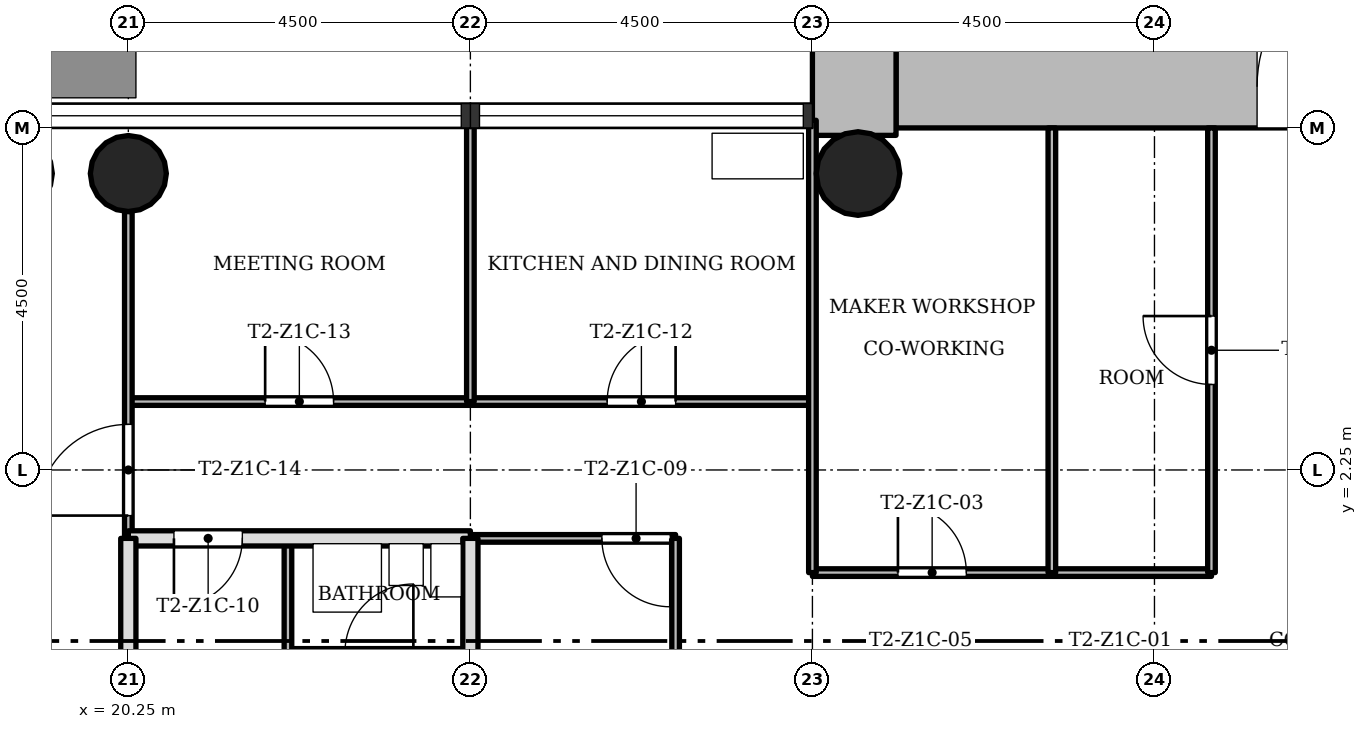
"""IFC4 building model, lengths in metres.
Left out: names, types, materials, properties, quantities, classifications, styles, units other than length and angle.
Written with IfcOpenShell. Run it as: python <this file> out.ifc"""

import sys

from ifc_helpers import new_model, si_unit, direction, frame, frame_2d, origin, origin_2d, place, context, subcontext, project, spatial, rectangle, hollow_circle, extrude, element, fill, save


model = new_model("IFC4")
c1 = context("Model", 3, precision=1e-05, world=origin(), true_north=direction((0.0, 1.0)))
c2 = subcontext(c1, "Body", "Model", "MODEL_VIEW")
j1 = project(units=[si_unit("LENGTHUNIT", "METRE"), si_unit("PLANEANGLEUNIT", "RADIAN")], contexts=[c1])
p1 = place(None, origin())
s1 = spatial("IfcSite", under=j1, at=p1, CompositionType="ELEMENT")
p2 = place(p1, origin())
s2 = spatial("IfcBuilding", under=s1, at=p2, CompositionType="ELEMENT")
p3 = place(p2, frame((0.0, 0.0, 51.7)))
s3 = spatial("IfcBuildingStorey", under=s2, at=p3, CompositionType="ELEMENT", Elevation=51.7)
p4 = place(p3, frame((30.35, 7.3, 0.0), z_axis=(0.0, 0.0, 1.0), x_axis=(1.0, 0.0, 0.0)))
e1 = element("IfcWall", 1, at=p4, inside=s3, PredefinedType="SHEAR", context=c2, shape_type="SweptSolid", body=[
    extrude(rectangle(XDim=12.4, YDim=1.1, at=frame_2d((6.2, 0.0))), origin(), (0.0, 0.0, 1.0), 3.4),
])
p5 = place(p4, frame((4.75, 0.0, 0.0)))
e2 = element("IfcOpeningElement", 2, at=p5, cuts=e1, PredefinedType="OPENING", context=c2, shape_type="SweptSolid", body=[
    extrude(rectangle(XDim=1.8, YDim=2.1, at=frame_2d((0.9, 1.05))), frame((0.0, 0.56, 0.0), z_axis=(0.0, -1.0, 0.0), x_axis=(1.0, 0.0, 0.0)), (0.0, 0.0, 1.0), 1.12),
])
p6 = place(p3, frame((29.8, 15.248, 0.0), z_axis=(0.0, 0.0, 1.0), x_axis=(0.0, -1.0, 0.0)))
e3 = element("IfcWall", 3, at=p6, inside=s3, PredefinedType="SHEAR", context=c2, shape_type="SweptSolid", body=[
    extrude(rectangle(XDim=8.596, YDim=1.1, at=frame_2d((4.298, 0.0))), origin(), (0.0, 0.0, 1.0), 3.4),
])
p7 = place(p3, frame((20.25, 6.15, 0.0), z_axis=(0.0, 0.0, 1.0), x_axis=(1.0, 0.0, 0.0)))
e4 = element("IfcColumn", 4, at=p7, inside=s3, PredefinedType="COLUMN", context=c2, shape_type="SweptSolid", body=[
    extrude(hollow_circle(Radius=0.5, WallThickness=0.036, at=origin_2d()), origin(), (0.0, 0.0, 1.0), 3.4),
])
p8 = place(p3, frame((29.85, 6.15, 0.0), z_axis=(0.0, 0.0, 1.0), x_axis=(1.0, 0.0, 0.0)))
e5 = element("IfcColumn", 5, at=p8, inside=s3, PredefinedType="COLUMN", context=c2, shape_type="SweptSolid", body=[
    extrude(hollow_circle(Radius=0.55, WallThickness=0.04, at=origin_2d()), origin(), (0.0, 0.0, 1.0), 3.4),
])
p9 = place(p3, frame((24.75, -0.15, 0.0), z_axis=(0.0, 0.0, 1.0), x_axis=(-1.0, 0.0, 0.0)))
e6 = element("IfcWall", 6, at=p9, inside=s3, PredefinedType="PARTITIONING", context=c2, shape_type="SweptSolid", body=[
    extrude(rectangle(XDim=2.4, YDim=0.1, at=frame_2d((1.2, 0.0))), origin(), (0.0, 0.0, 1.0), 3.0),
])
p10 = place(p9, frame((0.75, 0.0, 0.0)))
e7 = element("IfcOpeningElement", 7, at=p10, cuts=e6, PredefinedType="OPENING", context=c2, shape_type="SweptSolid", body=[
    extrude(rectangle(XDim=0.9, YDim=2.1, at=frame_2d((0.45, 1.05))), frame((0.0, 0.06, 0.0), z_axis=(0.0, -1.0, 0.0), x_axis=(1.0, 0.0, 0.0)), (0.0, 0.0, 1.0), 0.12),
])
p11 = place(p3, frame((34.5, 0.9, 0.0), z_axis=(0.0, 0.0, 1.0), x_axis=(-1.0, 0.0, 0.0)))
e8 = element("IfcWall", 8, at=p11, inside=s3, PredefinedType="PARTITIONING", context=c2, shape_type="SweptSolid", body=[
    extrude(rectangle(XDim=5.25, YDim=0.1, at=frame_2d((2.625, 0.0))), origin(), (0.0, 0.0, 1.0), 3.0),
])
p12 = place(p11, frame((3.225, 0.0, 0.0)))
e9 = element("IfcOpeningElement", 9, at=p12, cuts=e8, PredefinedType="OPENING", context=c2, shape_type="SweptSolid", body=[
    extrude(rectangle(XDim=0.9, YDim=2.1, at=frame_2d((0.45, 1.05))), frame((0.0, 0.06, 0.0), z_axis=(0.0, -1.0, 0.0), x_axis=(1.0, 0.0, 0.0)), (0.0, 0.0, 1.0), 0.12),
])
p13 = place(p3, frame((27.45, 1.35, 0.0), z_axis=(0.0, 0.0, 1.0), x_axis=(-1.0, 0.0, 0.0)))
e10 = element("IfcWall", 10, at=p13, inside=s3, PredefinedType="PARTITIONING", context=c2, shape_type="SweptSolid", body=[
    extrude(rectangle(XDim=2.7, YDim=0.1, at=frame_2d((1.35, 0.0))), origin(), (0.0, 0.0, 1.0), 3.0),
])
p14 = place(p13, frame((0.07, 0.0, 0.0)))
e11 = element("IfcOpeningElement", 11, at=p14, cuts=e10, PredefinedType="OPENING", context=c2, shape_type="SweptSolid", body=[
    extrude(rectangle(XDim=0.9, YDim=2.1, at=frame_2d((0.45, 1.05))), frame((0.0, 0.06, 0.0), z_axis=(0.0, -1.0, 0.0), x_axis=(1.0, 0.0, 0.0)), (0.0, 0.0, 1.0), 0.12),
])
p15 = place(p3, frame((24.75, 1.35, 0.0), z_axis=(0.0, 0.0, 1.0), x_axis=(-1.0, 0.0, 0.0)))
e12 = element("IfcWall", 12, at=p15, inside=s3, PredefinedType="SOLIDWALL", context=c2, shape_type="SweptSolid", body=[
    extrude(rectangle(XDim=4.5, YDim=0.2, at=frame_2d((2.25, 0.0))), origin(), (0.0, 0.0, 1.0), 3.0),
])
p16 = place(p15, frame((3.0, 0.0, 0.0)))
e13 = element("IfcOpeningElement", 13, at=p16, cuts=e12, PredefinedType="OPENING", context=c2, shape_type="SweptSolid", body=[
    extrude(rectangle(XDim=0.9, YDim=2.1, at=frame_2d((0.45, 1.05))), frame((0.0, 0.11, 0.0), z_axis=(0.0, -1.0, 0.0), x_axis=(1.0, 0.0, 0.0)), (0.0, 0.0, 1.0), 0.22),
])
p17 = place(p3, frame((29.25, 3.15, 0.0), z_axis=(0.0, 0.0, 1.0), x_axis=(-1.0, 0.0, 0.0)))
e14 = element("IfcWall", 14, at=p17, inside=s3, PredefinedType="PARTITIONING", context=c2, shape_type="SweptSolid", body=[
    extrude(rectangle(XDim=9.0, YDim=0.1, at=frame_2d((4.5, 0.0))), origin(), (0.0, 0.0, 1.0), 3.0),
])
p18 = place(p17, frame((1.8, 0.0, 0.0)))
e15 = element("IfcOpeningElement", 15, at=p18, cuts=e14, PredefinedType="OPENING", context=c2, shape_type="SweptSolid", body=[
    extrude(rectangle(XDim=0.9, YDim=2.1, at=frame_2d((0.45, 1.05))), frame((0.0, 0.06, 0.0), z_axis=(0.0, -1.0, 0.0), x_axis=(1.0, 0.0, 0.0)), (0.0, 0.0, 1.0), 0.12),
])
p19 = place(p17, frame((6.3, 0.0, 0.0)))
e16 = element("IfcOpeningElement", 16, at=p19, cuts=e14, PredefinedType="OPENING", context=c2, shape_type="SweptSolid", body=[
    extrude(rectangle(XDim=0.9, YDim=2.1, at=frame_2d((0.45, 1.05))), frame((0.0, 0.06, 0.0), z_axis=(0.0, -1.0, 0.0), x_axis=(1.0, 0.0, 0.0)), (0.0, 0.0, 1.0), 0.12),
])
p20 = place(p3, frame((34.5, 0.9, 0.0), z_axis=(0.0, 0.0, 1.0), x_axis=(0.0, 1.0, 0.0)))
e17 = element("IfcWall", 17, at=p20, inside=s3, PredefinedType="PARTITIONING", context=c2, shape_type="SweptSolid", body=[
    extrude(rectangle(XDim=5.85, YDim=0.1, at=frame_2d((2.925, 0.0))), origin(), (0.0, 0.0, 1.0), 3.0),
])
p21 = place(p20, frame((2.475, 0.0, 0.0)))
e18 = element("IfcOpeningElement", 18, at=p21, cuts=e17, PredefinedType="OPENING", context=c2, shape_type="SweptSolid", body=[
    extrude(rectangle(XDim=0.9, YDim=2.1, at=frame_2d((0.45, 1.05))), frame((0.0, 0.06, 0.0), z_axis=(0.0, -1.0, 0.0), x_axis=(1.0, 0.0, 0.0)), (0.0, 0.0, 1.0), 0.12),
])
p22 = place(p3, frame((32.4, 0.9, 0.0), z_axis=(0.0, 0.0, 1.0), x_axis=(0.0, 1.0, 0.0)))
e19 = element("IfcWall", 19, at=p22, inside=s3, PredefinedType="PARTITIONING", context=c2, shape_type="SweptSolid", body=[
    extrude(rectangle(XDim=5.85, YDim=0.1, at=frame_2d((2.925, 0.0))), origin(), (0.0, 0.0, 1.0), 3.0),
])
p23 = place(p3, frame((29.25, 0.9, 0.0), z_axis=(0.0, 0.0, 1.0), x_axis=(0.0, 1.0, 0.0)))
e20 = element("IfcWall", 20, at=p23, inside=s3, PredefinedType="PARTITIONING", context=c2, shape_type="SweptSolid", body=[
    extrude(rectangle(XDim=5.95, YDim=0.1, at=frame_2d((2.975, 0.0))), origin(), (0.0, 0.0, 1.0), 3.0),
])
p24 = place(p3, frame((27.45, -0.9, 0.0), z_axis=(0.0, 0.0, 1.0), x_axis=(0.0, 1.0, 0.0)))
e21 = element("IfcWall", 21, at=p24, inside=s3, PredefinedType="PARTITIONING", context=c2, shape_type="SweptSolid", body=[
    extrude(rectangle(XDim=2.25, YDim=0.1, at=frame_2d((1.125, 0.0))), origin(), (0.0, 0.0, 1.0), 3.0),
])
p25 = place(p3, frame((24.75, 3.15, 0.0), z_axis=(0.0, 0.0, 1.0), x_axis=(0.0, 1.0, 0.0)))
e22 = element("IfcWall", 22, at=p25, inside=s3, PredefinedType="PARTITIONING", context=c2, shape_type="SweptSolid", body=[
    extrude(rectangle(XDim=3.7, YDim=0.1, at=frame_2d((1.85, 0.0))), origin(), (0.0, 0.0, 1.0), 3.0),
])
p26 = place(p3, frame((24.75, -6.85, 0.0), z_axis=(0.0, 0.0, 1.0), x_axis=(0.0, 1.0, 0.0)))
e23 = element("IfcWall", 23, at=p26, inside=s3, PredefinedType="SOLIDWALL", context=c2, shape_type="SweptSolid", body=[
    extrude(rectangle(XDim=8.2, YDim=0.2, at=frame_2d((4.1, 0.0))), origin(), (0.0, 0.0, 1.0), 3.0),
])
p27 = place(p3, frame((22.35, -0.15, 0.0), z_axis=(0.0, 0.0, 1.0), x_axis=(0.0, 1.0, 0.0)))
e24 = element("IfcWall", 24, at=p27, inside=s3, PredefinedType="PARTITIONING", context=c2, shape_type="SweptSolid", body=[
    extrude(rectangle(XDim=1.5, YDim=0.1, at=frame_2d((0.75, 0.0))), origin(), (0.0, 0.0, 1.0), 3.0),
])
p28 = place(p3, frame((20.25, 1.35, 0.0), z_axis=(0.0, 0.0, 1.0), x_axis=(0.0, 1.0, 0.0)))
e25 = element("IfcWall", 25, at=p28, inside=s3, PredefinedType="PARTITIONING", context=c2, shape_type="SweptSolid", body=[
    extrude(rectangle(XDim=4.3, YDim=0.1, at=frame_2d((2.15, 0.0))), origin(), (0.0, 0.0, 1.0), 3.0),
])
p29 = place(p28, frame((0.3, 0.0, 0.0)))
e26 = element("IfcOpeningElement", 26, at=p29, cuts=e25, PredefinedType="OPENING", context=c2, shape_type="SweptSolid", body=[
    extrude(rectangle(XDim=1.2, YDim=2.1, at=frame_2d((0.6, 1.05))), frame((0.0, 0.06, 0.0), z_axis=(0.0, -1.0, 0.0), x_axis=(1.0, 0.0, 0.0)), (0.0, 0.0, 1.0), 0.12),
])
p30 = place(p3, frame((20.25, -5.65, 0.0), z_axis=(0.0, 0.0, 1.0), x_axis=(0.0, 1.0, 0.0)))
e27 = element("IfcWall", 27, at=p30, inside=s3, PredefinedType="SOLIDWALL", context=c2, shape_type="SweptSolid", body=[
    extrude(rectangle(XDim=7.0, YDim=0.2, at=frame_2d((3.5, 0.0))), origin(), (0.0, 0.0, 1.0), 3.0),
])
p31 = place(p21, origin())
e28 = element("IfcDoor", 28, at=p31, inside=s3, OperationType="SINGLE_SWING_LEFT", PredefinedType="DOOR", context=c2, shape_type="SweptSolid", body=[
    extrude(rectangle(XDim=0.9, YDim=2.1, at=frame_2d((0.45, 1.05))), frame((0.0, 0.025, 0.0), z_axis=(0.0, -1.0, 0.0), x_axis=(1.0, 0.0, 0.0)), (0.0, 0.0, 1.0), 0.05),
])
fill(e18, e28)
p32 = place(p12, origin())
e29 = element("IfcDoor", 29, at=p32, inside=s3, OperationType="SINGLE_SWING_RIGHT", PredefinedType="DOOR", context=c2, shape_type="SweptSolid", body=[
    extrude(rectangle(XDim=0.9, YDim=2.1, at=frame_2d((0.45, 1.05))), frame((0.0, 0.025, 0.0), z_axis=(0.0, -1.0, 0.0), x_axis=(1.0, 0.0, 0.0)), (0.0, 0.0, 1.0), 0.05),
])
fill(e9, e29)
p33 = place(p14, origin())
e30 = element("IfcDoor", 30, at=p33, inside=s3, OperationType="SINGLE_SWING_RIGHT", PredefinedType="DOOR", context=c2, shape_type="SweptSolid", body=[
    extrude(rectangle(XDim=0.9, YDim=2.1, at=frame_2d((0.45, 1.05))), frame((0.0, 0.025, 0.0), z_axis=(0.0, -1.0, 0.0), x_axis=(1.0, 0.0, 0.0)), (0.0, 0.0, 1.0), 0.05),
])
fill(e11, e30)
p34 = place(p16, origin())
e31 = element("IfcDoor", 31, at=p34, inside=s3, OperationType="SINGLE_SWING_LEFT", PredefinedType="DOOR", context=c2, shape_type="SweptSolid", body=[
    extrude(rectangle(XDim=0.9, YDim=2.1, at=frame_2d((0.45, 1.05))), frame((0.0, 0.025, 0.0), z_axis=(0.0, -1.0, 0.0), x_axis=(1.0, 0.0, 0.0)), (0.0, 0.0, 1.0), 0.05),
])
fill(e13, e31)
p35 = place(p18, origin())
e32 = element("IfcDoor", 32, at=p35, inside=s3, OperationType="SINGLE_SWING_LEFT", PredefinedType="DOOR", context=c2, shape_type="SweptSolid", body=[
    extrude(rectangle(XDim=0.9, YDim=2.1, at=frame_2d((0.45, 1.05))), frame((0.0, 0.025, 0.0), z_axis=(0.0, -1.0, 0.0), x_axis=(1.0, 0.0, 0.0)), (0.0, 0.0, 1.0), 0.05),
])
fill(e15, e32)
p36 = place(p19, origin())
e33 = element("IfcDoor", 33, at=p36, inside=s3, OperationType="SINGLE_SWING_RIGHT", PredefinedType="DOOR", context=c2, shape_type="SweptSolid", body=[
    extrude(rectangle(XDim=0.9, YDim=2.1, at=frame_2d((0.45, 1.05))), frame((0.0, 0.025, 0.0), z_axis=(0.0, -1.0, 0.0), x_axis=(1.0, 0.0, 0.0)), (0.0, 0.0, 1.0), 0.05),
])
fill(e16, e33)
p37 = place(p29, origin())
e34 = element("IfcDoor", 34, at=p37, inside=s3, OperationType="SINGLE_SWING_RIGHT", PredefinedType="DOOR", context=c2, shape_type="SweptSolid", body=[
    extrude(rectangle(XDim=1.2, YDim=2.1, at=frame_2d((0.6, 1.05))), frame((0.0, 0.025, 0.0), z_axis=(0.0, -1.0, 0.0), x_axis=(1.0, 0.0, 0.0)), (0.0, 0.0, 1.0), 0.05),
])
fill(e26, e34)
p38 = place(p5, origin())
e35 = element("IfcDoor", 35, at=p38, inside=s3, OperationType="SINGLE_SWING_LEFT", PredefinedType="DOOR", context=c2, shape_type="SweptSolid", body=[
    extrude(rectangle(XDim=1.8, YDim=2.1, at=frame_2d((0.9, 1.05))), frame((0.0, 0.025, 0.0), z_axis=(0.0, -1.0, 0.0), x_axis=(1.0, 0.0, 0.0)), (0.0, 0.0, 1.0), 0.05),
])
fill(e2, e35)
save(model, sys.argv[1])
